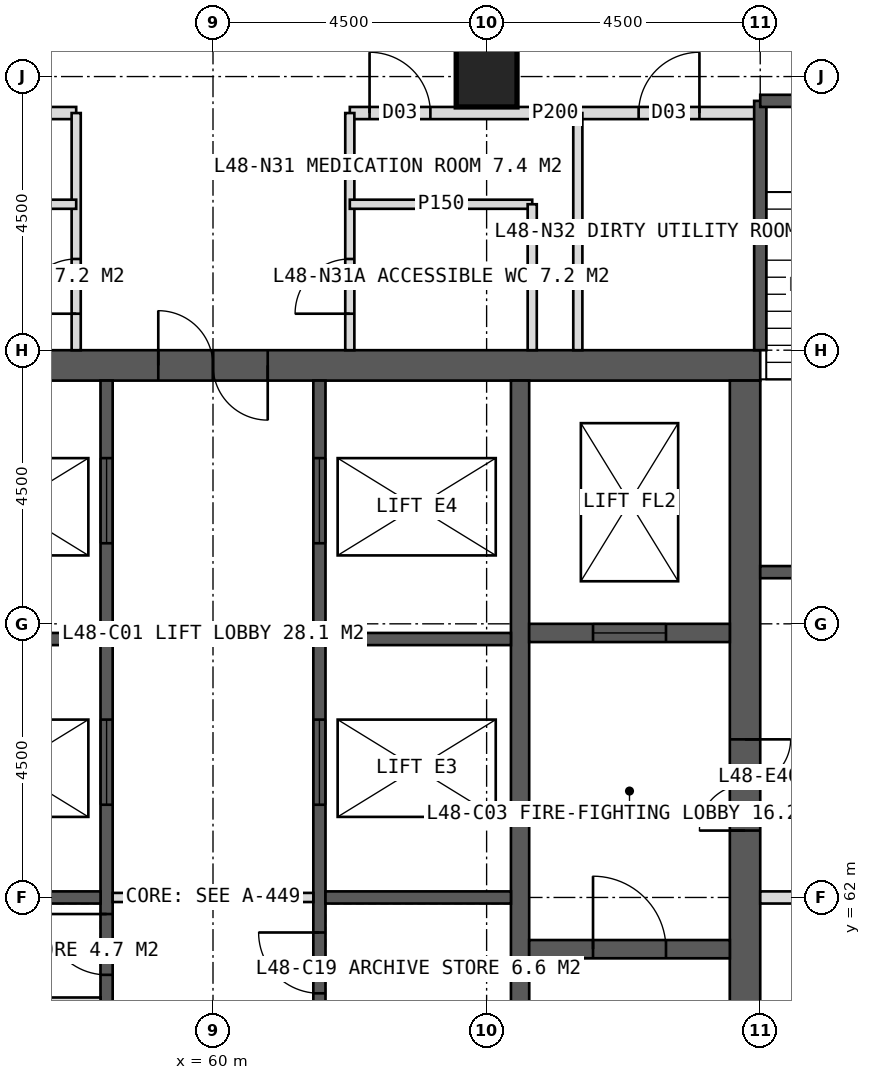
"""IFC4 building model, lengths in metres.
Left out: names, types, materials, properties, quantities, classifications, styles, units other than length and angle.
Written with IfcOpenShell. Run it as: python <this file> out.ifc"""

import sys

from ifc_helpers import new_model, si_unit, direction, frame, frame_2d, origin, origin_2d, place, context, subcontext, project, spatial, rectangle, hollow_rectangle, extrude, element, fill, save


model = new_model("IFC4")
c1 = context("Model", 3, precision=1e-05, world=origin(), true_north=direction((0.0, 1.0)))
c2 = subcontext(c1, "Body", "Model", "MODEL_VIEW")
j1 = project(units=[si_unit("LENGTHUNIT", "METRE"), si_unit("PLANEANGLEUNIT", "RADIAN")], contexts=[c1])
p1 = place(None, origin())
s1 = spatial("IfcSite", under=j1, at=p1, CompositionType="ELEMENT")
p2 = place(p1, origin())
s2 = spatial("IfcBuilding", under=s1, at=p2, CompositionType="ELEMENT")
p3 = place(p2, frame((0.0, 0.0, 201.0)))
s3 = spatial("IfcBuildingStorey", under=s2, at=p3, CompositionType="ELEMENT", Elevation=201.0)
p4 = place(p3, frame((51.0, 70.75, 0.0), z_axis=(0.0, 0.0, 1.0), x_axis=(1.0, 0.0, 0.0)))
e1 = element("IfcWall", 1, at=p4, inside=s3, PredefinedType="SHEAR", context=c2, shape_type="SweptSolid", body=[
    extrude(rectangle(XDim=18.0, YDim=0.5, at=frame_2d((9.0, 0.0))), origin(), (0.0, 0.0, 1.0), 4.0),
])
p5 = place(p4, frame((8.1, 0.0, 0.0)))
e2 = element("IfcOpeningElement", 2, at=p5, cuts=e1, PredefinedType="OPENING", context=c2, shape_type="SweptSolid", body=[
    extrude(rectangle(XDim=1.8, YDim=2.2, at=frame_2d((0.9, 1.1))), frame((0.0, 0.26, 0.0), z_axis=(0.0, -1.0, 0.0), x_axis=(1.0, 0.0, 0.0)), (0.0, 0.0, 1.0), 0.52),
])
p6 = place(p3, frame((68.75, 53.5, 0.0), z_axis=(0.0, 0.0, 1.0), x_axis=(0.0, 1.0, 0.0)))
e3 = element("IfcWall", 3, at=p6, inside=s3, PredefinedType="SHEAR", context=c2, shape_type="SweptSolid", body=[
    extrude(rectangle(XDim=17.0, YDim=0.5, at=frame_2d((8.5, 0.0))), origin(), (0.0, 0.0, 1.0), 4.0),
])
p7 = place(p6, frame((9.6, 0.0, 0.0)))
e4 = element("IfcOpeningElement", 4, at=p7, cuts=e3, PredefinedType="OPENING", context=c2, shape_type="SweptSolid", body=[
    extrude(rectangle(XDim=1.5, YDim=2.2, at=frame_2d((0.75, 1.1))), frame((0.0, 0.26, 0.0), z_axis=(0.0, -1.0, 0.0), x_axis=(1.0, 0.0, 0.0)), (0.0, 0.0, 1.0), 0.52),
])
p8 = place(p3, frame((65.05, 53.5, 0.0), z_axis=(0.0, 0.0, 1.0), x_axis=(0.0, 1.0, 0.0)))
e5 = element("IfcWall", 5, at=p8, inside=s3, PredefinedType="SHEAR", context=c2, shape_type="SweptSolid", body=[
    extrude(rectangle(XDim=17.0, YDim=0.3, at=frame_2d((8.5, 0.0))), origin(), (0.0, 0.0, 1.0), 4.0),
])
p9 = place(p3, frame((58.25, 53.5, 0.0), z_axis=(0.0, 0.0, 1.0), x_axis=(0.0, 1.0, 0.0)))
e6 = element("IfcWall", 6, at=p9, inside=s3, PredefinedType="SHEAR", context=c2, shape_type="SweptSolid", body=[
    extrude(rectangle(XDim=17.0, YDim=0.2, at=frame_2d((8.5, 0.0))), origin(), (0.0, 0.0, 1.0), 4.0),
])
p10 = place(p9, frame((0.393, 0.0, 0.0)))
e7 = element("IfcOpeningElement", 7, at=p10, cuts=e6, PredefinedType="OPENING", context=c2, shape_type="SweptSolid", body=[
    extrude(rectangle(XDim=1.0, YDim=2.1, at=frame_2d((0.5, 1.05))), frame((0.0, 0.11, 0.0), z_axis=(0.0, -1.0, 0.0), x_axis=(1.0, 0.0, 0.0)), (0.0, 0.0, 1.0), 0.22),
])
p11 = place(p9, frame((2.542, 0.0, 0.0)))
e8 = element("IfcOpeningElement", 8, at=p11, cuts=e6, PredefinedType="OPENING", context=c2, shape_type="SweptSolid", body=[
    extrude(rectangle(XDim=1.0, YDim=2.1, at=frame_2d((0.5, 1.05))), frame((0.0, 0.11, 0.0), z_axis=(0.0, -1.0, 0.0), x_axis=(1.0, 0.0, 0.0)), (0.0, 0.0, 1.0), 0.22),
])
p12 = place(p9, frame((5.127, 0.0, 0.0)))
e9 = element("IfcOpeningElement", 9, at=p12, cuts=e6, PredefinedType="OPENING", context=c2, shape_type="SweptSolid", body=[
    extrude(rectangle(XDim=1.0, YDim=2.1, at=frame_2d((0.5, 1.05))), frame((0.0, 0.11, 0.0), z_axis=(0.0, -1.0, 0.0), x_axis=(1.0, 0.0, 0.0)), (0.0, 0.0, 1.0), 0.22),
])
p13 = place(p9, frame((7.228, 0.0, 0.0)))
e10 = element("IfcOpeningElement", 10, at=p13, cuts=e6, PredefinedType="OPENING", context=c2, shape_type="SweptSolid", body=[
    extrude(rectangle(XDim=1.0, YDim=2.1, at=frame_2d((0.5, 1.05))), frame((0.0, 0.11, 0.0), z_axis=(0.0, -1.0, 0.0), x_axis=(1.0, 0.0, 0.0)), (0.0, 0.0, 1.0), 0.22),
])
p14 = place(p9, frame((10.025, 0.0, 0.0)))
e11 = element("IfcOpeningElement", 11, at=p14, cuts=e6, PredefinedType="OPENING", context=c2, shape_type="SweptSolid", body=[
    extrude(rectangle(XDim=1.4, YDim=2.2, at=frame_2d((0.7, 1.1))), frame((0.0, 0.11, 0.0), z_axis=(0.0, -1.0, 0.0), x_axis=(1.0, 0.0, 0.0)), (0.0, 0.0, 1.0), 0.22),
])
p15 = place(p9, frame((14.325, 0.0, 0.0)))
e12 = element("IfcOpeningElement", 12, at=p15, cuts=e6, PredefinedType="OPENING", context=c2, shape_type="SweptSolid", body=[
    extrude(rectangle(XDim=1.4, YDim=2.2, at=frame_2d((0.7, 1.1))), frame((0.0, 0.11, 0.0), z_axis=(0.0, -1.0, 0.0), x_axis=(1.0, 0.0, 0.0)), (0.0, 0.0, 1.0), 0.22),
])
p16 = place(p3, frame((61.75, 53.5, 0.0), z_axis=(0.0, 0.0, 1.0), x_axis=(0.0, 1.0, 0.0)))
e13 = element("IfcWall", 13, at=p16, inside=s3, PredefinedType="SHEAR", context=c2, shape_type="SweptSolid", body=[
    extrude(rectangle(XDim=17.0, YDim=0.2, at=frame_2d((8.5, 0.0))), origin(), (0.0, 0.0, 1.0), 4.0),
])
p17 = place(p16, frame((0.6, 0.0, 0.0)))
e14 = element("IfcOpeningElement", 14, at=p17, cuts=e13, PredefinedType="OPENING", context=c2, shape_type="SweptSolid", body=[
    extrude(rectangle(XDim=1.0, YDim=2.1, at=frame_2d((0.5, 1.05))), frame((0.0, 0.11, 0.0), z_axis=(0.0, -1.0, 0.0), x_axis=(1.0, 0.0, 0.0)), (0.0, 0.0, 1.0), 0.22),
])
p18 = place(p16, frame((2.75, 0.0, 0.0)))
e15 = element("IfcOpeningElement", 15, at=p18, cuts=e13, PredefinedType="OPENING", context=c2, shape_type="SweptSolid", body=[
    extrude(rectangle(XDim=1.0, YDim=2.1, at=frame_2d((0.5, 1.05))), frame((0.0, 0.11, 0.0), z_axis=(0.0, -1.0, 0.0), x_axis=(1.0, 0.0, 0.0)), (0.0, 0.0, 1.0), 0.22),
])
p19 = place(p16, frame((4.824, 0.0, 0.0)))
e16 = element("IfcOpeningElement", 16, at=p19, cuts=e13, PredefinedType="OPENING", context=c2, shape_type="SweptSolid", body=[
    extrude(rectangle(XDim=1.0, YDim=2.1, at=frame_2d((0.5, 1.05))), frame((0.0, 0.11, 0.0), z_axis=(0.0, -1.0, 0.0), x_axis=(1.0, 0.0, 0.0)), (0.0, 0.0, 1.0), 0.22),
])
p20 = place(p16, frame((6.924, 0.0, 0.0)))
e17 = element("IfcOpeningElement", 17, at=p20, cuts=e13, PredefinedType="OPENING", context=c2, shape_type="SweptSolid", body=[
    extrude(rectangle(XDim=1.0, YDim=2.1, at=frame_2d((0.5, 1.05))), frame((0.0, 0.11, 0.0), z_axis=(0.0, -1.0, 0.0), x_axis=(1.0, 0.0, 0.0)), (0.0, 0.0, 1.0), 0.22),
])
p21 = place(p16, frame((10.025, 0.0, 0.0)))
e18 = element("IfcOpeningElement", 18, at=p21, cuts=e13, PredefinedType="OPENING", context=c2, shape_type="SweptSolid", body=[
    extrude(rectangle(XDim=1.4, YDim=2.2, at=frame_2d((0.7, 1.1))), frame((0.0, 0.11, 0.0), z_axis=(0.0, -1.0, 0.0), x_axis=(1.0, 0.0, 0.0)), (0.0, 0.0, 1.0), 0.22),
])
p22 = place(p16, frame((14.325, 0.0, 0.0)))
e19 = element("IfcOpeningElement", 19, at=p22, cuts=e13, PredefinedType="OPENING", context=c2, shape_type="SweptSolid", body=[
    extrude(rectangle(XDim=1.4, YDim=2.2, at=frame_2d((0.7, 1.1))), frame((0.0, 0.11, 0.0), z_axis=(0.0, -1.0, 0.0), x_axis=(1.0, 0.0, 0.0)), (0.0, 0.0, 1.0), 0.22),
])
for number, where, z_axis, x_axis in (
    (20, (55.1, 62.0, 0.0), (0.0, 0.0, 1.0), (1.0, 0.0, 0.0)),
    (21, (61.85, 62.0, 0.0), (0.0, 0.0, 1.0), (1.0, 0.0, 0.0)),
    (22, (55.1, 66.25, 0.0), (0.0, 0.0, 1.0), (1.0, 0.0, 0.0)),
    (23, (61.85, 66.25, 0.0), (0.0, 0.0, 1.0), (1.0, 0.0, 0.0)),
):
    element("IfcWall", number, at=place(p3, frame(where, z_axis=z_axis, x_axis=x_axis)), inside=s3, PredefinedType="SHEAR", context=c2, shape_type="SweptSolid", body=[
        extrude(rectangle(XDim=3.05, YDim=0.2, at=frame_2d((1.525, 0.0))), origin(), (0.0, 0.0, 1.0), 4.0),
    ])
p23 = place(p3, frame((65.2, 61.15, 0.0), z_axis=(0.0, 0.0, 1.0), x_axis=(1.0, 0.0, 0.0)))
e24 = element("IfcWall", 24, at=p23, inside=s3, PredefinedType="SHEAR", context=c2, shape_type="SweptSolid", body=[
    extrude(rectangle(XDim=3.3, YDim=0.3, at=frame_2d((1.65, 0.0))), origin(), (0.0, 0.0, 1.0), 4.0),
])
p24 = place(p23, frame((1.05, 0.0, 0.0)))
e25 = element("IfcOpeningElement", 25, at=p24, cuts=e24, PredefinedType="OPENING", context=c2, shape_type="SweptSolid", body=[
    extrude(rectangle(XDim=1.2, YDim=2.1, at=frame_2d((0.6, 1.05))), frame((0.0, 0.16, 0.0), z_axis=(0.0, -1.0, 0.0), x_axis=(1.0, 0.0, 0.0)), (0.0, 0.0, 1.0), 0.32),
])
p25 = place(p3, frame((65.2, 66.35, 0.0), z_axis=(0.0, 0.0, 1.0), x_axis=(1.0, 0.0, 0.0)))
e26 = element("IfcWall", 26, at=p25, inside=s3, PredefinedType="SHEAR", context=c2, shape_type="SweptSolid", body=[
    extrude(rectangle(XDim=3.3, YDim=0.3, at=frame_2d((1.65, 0.0))), origin(), (0.0, 0.0, 1.0), 4.0),
])
p26 = place(p25, frame((1.05, 0.0, 0.0)))
e27 = element("IfcOpeningElement", 27, at=p26, cuts=e26, PredefinedType="OPENING", context=c2, shape_type="SweptSolid", body=[
    extrude(rectangle(XDim=1.2, YDim=2.2, at=frame_2d((0.6, 1.1))), frame((0.0, 0.16, 0.0), z_axis=(0.0, -1.0, 0.0), x_axis=(1.0, 0.0, 0.0)), (0.0, 0.0, 1.0), 0.32),
])
p27 = place(p3, frame((64.5, 75.5, 0.0), z_axis=(0.0, 0.0, 1.0), x_axis=(1.0, 0.0, 0.0)))
e28 = element("IfcColumn", 28, at=p27, inside=s3, PredefinedType="COLUMN", context=c2, shape_type="SweptSolid", body=[
    extrude(hollow_rectangle(XDim=1.0, YDim=1.0, WallThickness=0.1, at=origin_2d()), origin(), (0.0, 0.0, 1.0), 4.0),
])
p28 = place(p3, frame((51.0, 74.9, 0.0), z_axis=(0.0, 0.0, 1.0), x_axis=(1.0, 0.0, 0.0)))
e29 = element("IfcWall", 29, at=p28, inside=s3, PredefinedType="PARTITIONING", context=c2, shape_type="SweptSolid", body=[
    extrude(rectangle(XDim=6.75, YDim=0.2, at=frame_2d((3.375, 0.0))), origin(), (0.0, 0.0, 1.0), 3.75),
])
p29 = place(p28, frame((1.45, 0.0, 0.0)))
e30 = element("IfcOpeningElement", 30, at=p29, cuts=e29, PredefinedType="OPENING", context=c2, shape_type="SweptSolid", body=[
    extrude(rectangle(XDim=1.0, YDim=2.1, at=frame_2d((0.5, 1.05))), frame((0.0, 0.11, 0.0), z_axis=(0.0, -1.0, 0.0), x_axis=(1.0, 0.0, 0.0)), (0.0, 0.0, 1.0), 0.22),
])
p30 = place(p3, frame((62.25, 74.9, 0.0), z_axis=(0.0, 0.0, 1.0), x_axis=(1.0, 0.0, 0.0)))
e31 = element("IfcWall", 31, at=p30, inside=s3, PredefinedType="PARTITIONING", context=c2, shape_type="SweptSolid", body=[
    extrude(rectangle(XDim=6.75, YDim=0.2, at=frame_2d((3.375, 0.0))), origin(), (0.0, 0.0, 1.0), 3.75),
])
p31 = place(p30, frame((0.325, 0.0, 0.0)))
e32 = element("IfcOpeningElement", 32, at=p31, cuts=e31, PredefinedType="OPENING", context=c2, shape_type="SweptSolid", body=[
    extrude(rectangle(XDim=1.0, YDim=2.1, at=frame_2d((0.5, 1.05))), frame((0.0, 0.11, 0.0), z_axis=(0.0, -1.0, 0.0), x_axis=(1.0, 0.0, 0.0)), (0.0, 0.0, 1.0), 0.22),
])
p32 = place(p30, frame((4.75, 0.0, 0.0)))
e33 = element("IfcOpeningElement", 33, at=p32, cuts=e31, PredefinedType="OPENING", context=c2, shape_type="SweptSolid", body=[
    extrude(rectangle(XDim=1.0, YDim=2.1, at=frame_2d((0.5, 1.05))), frame((0.0, 0.11, 0.0), z_axis=(0.0, -1.0, 0.0), x_axis=(1.0, 0.0, 0.0)), (0.0, 0.0, 1.0), 0.22),
])
p33 = place(p3, frame((57.75, 71.0, 0.0), z_axis=(0.0, 0.0, 1.0), x_axis=(0.0, 1.0, 0.0)))
e34 = element("IfcWall", 34, at=p33, inside=s3, PredefinedType="PARTITIONING", context=c2, shape_type="SweptSolid", body=[
    extrude(rectangle(XDim=3.9, YDim=0.15, at=frame_2d((1.95, 0.0))), origin(), (0.0, 0.0, 1.0), 3.75),
])
p34 = place(p33, frame((0.6, 0.0, 0.0)))
e35 = element("IfcOpeningElement", 35, at=p34, cuts=e34, PredefinedType="OPENING", context=c2, shape_type="SweptSolid", body=[
    extrude(rectangle(XDim=0.9, YDim=2.1, at=frame_2d((0.45, 1.05))), frame((0.0, 0.085, 0.0), z_axis=(0.0, -1.0, 0.0), x_axis=(1.0, 0.0, 0.0)), (0.0, 0.0, 1.0), 0.17),
])
p35 = place(p3, frame((62.25, 71.0, 0.0), z_axis=(0.0, 0.0, 1.0), x_axis=(0.0, 1.0, 0.0)))
e36 = element("IfcWall", 36, at=p35, inside=s3, PredefinedType="PARTITIONING", context=c2, shape_type="SweptSolid", body=[
    extrude(rectangle(XDim=3.9, YDim=0.15, at=frame_2d((1.95, 0.0))), origin(), (0.0, 0.0, 1.0), 3.75),
])
p36 = place(p35, frame((0.6, 0.0, 0.0)))
e37 = element("IfcOpeningElement", 37, at=p36, cuts=e36, PredefinedType="OPENING", context=c2, shape_type="SweptSolid", body=[
    extrude(rectangle(XDim=0.9, YDim=2.1, at=frame_2d((0.45, 1.05))), frame((0.0, 0.085, 0.0), z_axis=(0.0, -1.0, 0.0), x_axis=(1.0, 0.0, 0.0)), (0.0, 0.0, 1.0), 0.17),
])
p37 = place(p3, frame((66.0, 71.0, 0.0), z_axis=(0.0, 0.0, 1.0), x_axis=(0.0, 1.0, 0.0)))
e38 = element("IfcWall", 38, at=p37, inside=s3, PredefinedType="PARTITIONING", context=c2, shape_type="SweptSolid", body=[
    extrude(rectangle(XDim=3.9, YDim=0.15, at=frame_2d((1.95, 0.0))), origin(), (0.0, 0.0, 1.0), 3.75),
])
for number, where, z_axis, x_axis in (
    (39, (54.75, 73.4, 0.0), (0.0, 0.0, 1.0), (1.0, 0.0, 0.0)),
    (40, (62.25, 73.4, 0.0), (0.0, 0.0, 1.0), (1.0, 0.0, 0.0)),
):
    element("IfcWall", number, at=place(p3, frame(where, z_axis=z_axis, x_axis=x_axis)), inside=s3, PredefinedType="PARTITIONING", context=c2, shape_type="SweptSolid", body=[
        extrude(rectangle(XDim=3.0, YDim=0.15, at=frame_2d((1.5, 0.0))), origin(), (0.0, 0.0, 1.0), 3.75),
    ])
p38 = place(p3, frame((65.25, 71.0, 0.0), z_axis=(0.0, 0.0, 1.0), x_axis=(0.0, 1.0, 0.0)))
e41 = element("IfcWall", 41, at=p38, inside=s3, PredefinedType="PARTITIONING", context=c2, shape_type="SweptSolid", body=[
    extrude(rectangle(XDim=2.4, YDim=0.15, at=frame_2d((1.2, 0.0))), origin(), (0.0, 0.0, 1.0), 3.75),
])
p39 = place(p3, frame((69.0, 62.0, 0.0), z_axis=(0.0, 0.0, 1.0), x_axis=(1.0, 0.0, 0.0)))
e42 = element("IfcWall", 42, at=p39, inside=s3, PredefinedType="SOLIDWALL", context=c2, shape_type="SweptSolid", body=[
    extrude(rectangle(XDim=5.7, YDim=0.2, at=frame_2d((2.85, 0.0))), origin(), (0.0, 0.0, 1.0), 2.95),
])
p40 = place(p3, frame((55.1, 60.28, 0.0), z_axis=(0.0, 0.0, 1.0), x_axis=(1.0, 0.0, 0.0)))
e43 = element("IfcWall", 43, at=p40, inside=s3, PredefinedType="PARTITIONING", context=c2, shape_type="SweptSolid", body=[
    extrude(rectangle(XDim=3.05, YDim=0.15, at=frame_2d((1.525, 0.0))), origin(), (0.0, 0.0, 1.0), 3.75),
])
p41 = place(p3, frame((58.35, 62.0, 0.0), z_axis=(0.0, 0.0, 1.0), x_axis=(1.0, 0.0, 0.0)))
e44 = element("IfcWall", 44, at=p41, inside=s3, PredefinedType="PARTITIONING", context=c2, shape_type="SweptSolid", body=[
    extrude(rectangle(XDim=3.3, YDim=0.15, at=frame_2d((1.65, 0.0))), origin(), (0.0, 0.0, 1.0), 3.75),
])
p42 = place(p3, frame((69.0, 71.0, 0.0), z_axis=(0.0, 0.0, 1.0), x_axis=(0.0, 1.0, 0.0)))
e45 = element("IfcWall", 45, at=p42, inside=s3, PredefinedType="SOLIDWALL", context=c2, shape_type="SweptSolid", body=[
    extrude(rectangle(XDim=4.1, YDim=0.2, at=frame_2d((2.05, 0.0))), origin(), (0.0, 0.0, 1.0), 3.75),
])
p43 = place(p3, frame((69.0, 67.35, 0.0), z_axis=(0.0, 0.0, 1.0), x_axis=(1.0, 0.0, 0.0)))
e46 = element("IfcWall", 46, at=p43, inside=s3, PredefinedType="SOLIDWALL", context=c2, shape_type="SweptSolid", body=[
    extrude(rectangle(XDim=3.5, YDim=0.2, at=frame_2d((1.75, 0.0))), origin(), (0.0, 0.0, 1.0), 3.75),
])
p44 = place(p3, frame((69.0, 75.1, 0.0), z_axis=(0.0, 0.0, 1.0), x_axis=(1.0, 0.0, 0.0)))
e47 = element("IfcWall", 47, at=p44, inside=s3, PredefinedType="SOLIDWALL", context=c2, shape_type="SweptSolid", body=[
    extrude(rectangle(XDim=3.5, YDim=0.2, at=frame_2d((1.75, 0.0))), origin(), (0.0, 0.0, 1.0), 3.75),
])
p45 = place(p44, frame((1.15, 0.0, 0.0)))
e48 = element("IfcOpeningElement", 48, at=p45, cuts=e47, PredefinedType="OPENING", context=c2, shape_type="SweptSolid", body=[
    extrude(rectangle(XDim=1.2, YDim=2.1, at=frame_2d((0.6, 1.05))), frame((0.0, 0.11, 0.0), z_axis=(0.0, -1.0, 0.0), x_axis=(1.0, 0.0, 0.0)), (0.0, 0.0, 1.0), 0.22),
])
p46 = place(p34, origin())
e49 = element("IfcDoor", 49, at=p46, inside=s3, OperationType="SINGLE_SWING_LEFT", PredefinedType="DOOR", context=c2, shape_type="SweptSolid", body=[
    extrude(rectangle(XDim=0.9, YDim=2.1, at=frame_2d((0.45, 1.05))), frame((0.0, 0.025, 0.0), z_axis=(0.0, -1.0, 0.0), x_axis=(1.0, 0.0, 0.0)), (0.0, 0.0, 1.0), 0.05),
])
fill(e35, e49)
p47 = place(p36, origin())
e50 = element("IfcDoor", 50, at=p47, inside=s3, OperationType="SINGLE_SWING_LEFT", PredefinedType="DOOR", context=c2, shape_type="SweptSolid", body=[
    extrude(rectangle(XDim=0.9, YDim=2.1, at=frame_2d((0.45, 1.05))), frame((0.0, 0.025, 0.0), z_axis=(0.0, -1.0, 0.0), x_axis=(1.0, 0.0, 0.0)), (0.0, 0.0, 1.0), 0.05),
])
fill(e37, e50)
p48 = place(p31, origin())
e51 = element("IfcDoor", 51, at=p48, inside=s3, OperationType="SINGLE_SWING_LEFT", PredefinedType="DOOR", context=c2, shape_type="SweptSolid", body=[
    extrude(rectangle(XDim=1.0, YDim=2.1, at=frame_2d((0.5, 1.05))), frame((0.0, 0.025, 0.0), z_axis=(0.0, -1.0, 0.0), x_axis=(1.0, 0.0, 0.0)), (0.0, 0.0, 1.0), 0.05),
])
fill(e32, e51)
p49 = place(p32, origin())
e52 = element("IfcDoor", 52, at=p49, inside=s3, OperationType="SINGLE_SWING_RIGHT", PredefinedType="DOOR", context=c2, shape_type="SweptSolid", body=[
    extrude(rectangle(XDim=1.0, YDim=2.1, at=frame_2d((0.5, 1.05))), frame((0.0, 0.025, 0.0), z_axis=(0.0, -1.0, 0.0), x_axis=(1.0, 0.0, 0.0)), (0.0, 0.0, 1.0), 0.05),
])
fill(e33, e52)
p50 = place(p5, origin())
e53 = element("IfcDoor", 53, at=p50, inside=s3, OperationType="DOUBLE_DOOR_SINGLE_SWING", PredefinedType="DOOR", context=c2, shape_type="SweptSolid", body=[
    extrude(rectangle(XDim=1.8, YDim=2.2, at=frame_2d((0.9, 1.1))), frame((0.0, 0.025, 0.0), z_axis=(0.0, -1.0, 0.0), x_axis=(1.0, 0.0, 0.0)), (0.0, 0.0, 1.0), 0.05),
])
fill(e2, e53)
p51 = place(p7, origin())
e54 = element("IfcDoor", 54, at=p51, inside=s3, OperationType="DOUBLE_DOOR_SINGLE_SWING", PredefinedType="DOOR", context=c2, shape_type="SweptSolid", body=[
    extrude(rectangle(XDim=1.5, YDim=2.2, at=frame_2d((0.75, 1.1))), frame((0.0, 0.025, 0.0), z_axis=(0.0, -1.0, 0.0), x_axis=(1.0, 0.0, 0.0)), (0.0, 0.0, 1.0), 0.05),
])
fill(e4, e54)
p52 = place(p24, origin())
e55 = element("IfcDoor", 55, at=p52, inside=s3, OperationType="SINGLE_SWING_LEFT", PredefinedType="DOOR", context=c2, shape_type="SweptSolid", body=[
    extrude(rectangle(XDim=1.2, YDim=2.1, at=frame_2d((0.6, 1.05))), frame((0.0, 0.025, 0.0), z_axis=(0.0, -1.0, 0.0), x_axis=(1.0, 0.0, 0.0)), (0.0, 0.0, 1.0), 0.05),
])
fill(e25, e55)
p53 = place(p26, origin())
e56 = element("IfcDoor", 56, at=p53, inside=s3, OperationType="SLIDING_TO_LEFT", PredefinedType="DOOR", context=c2, shape_type="SweptSolid", body=[
    extrude(rectangle(XDim=1.2, YDim=2.2, at=frame_2d((0.6, 1.1))), frame((0.0, 0.025, 0.0), z_axis=(0.0, -1.0, 0.0), x_axis=(1.0, 0.0, 0.0)), (0.0, 0.0, 1.0), 0.05),
])
fill(e27, e56)
p54 = place(p13, origin())
e57 = element("IfcDoor", 57, at=p54, inside=s3, OperationType="SINGLE_SWING_RIGHT", PredefinedType="DOOR", context=c2, shape_type="SweptSolid", body=[
    extrude(rectangle(XDim=1.0, YDim=2.1, at=frame_2d((0.5, 1.05))), frame((0.0, 0.025, 0.0), z_axis=(0.0, -1.0, 0.0), x_axis=(1.0, 0.0, 0.0)), (0.0, 0.0, 1.0), 0.05),
])
fill(e10, e57)
p55 = place(p20, origin())
e58 = element("IfcDoor", 58, at=p55, inside=s3, OperationType="SINGLE_SWING_RIGHT", PredefinedType="DOOR", context=c2, shape_type="SweptSolid", body=[
    extrude(rectangle(XDim=1.0, YDim=2.1, at=frame_2d((0.5, 1.05))), frame((0.0, 0.025, 0.0), z_axis=(0.0, -1.0, 0.0), x_axis=(1.0, 0.0, 0.0)), (0.0, 0.0, 1.0), 0.05),
])
fill(e17, e58)
p56 = place(p14, origin())
e59 = element("IfcDoor", 59, at=p56, inside=s3, OperationType="SLIDING_TO_LEFT", PredefinedType="DOOR", context=c2, shape_type="SweptSolid", body=[
    extrude(rectangle(XDim=1.4, YDim=2.2, at=frame_2d((0.7, 1.1))), frame((0.0, 0.025, 0.0), z_axis=(0.0, -1.0, 0.0), x_axis=(1.0, 0.0, 0.0)), (0.0, 0.0, 1.0), 0.05),
])
fill(e11, e59)
p57 = place(p21, origin())
e60 = element("IfcDoor", 60, at=p57, inside=s3, OperationType="SLIDING_TO_LEFT", PredefinedType="DOOR", context=c2, shape_type="SweptSolid", body=[
    extrude(rectangle(XDim=1.4, YDim=2.2, at=frame_2d((0.7, 1.1))), frame((0.0, 0.025, 0.0), z_axis=(0.0, -1.0, 0.0), x_axis=(1.0, 0.0, 0.0)), (0.0, 0.0, 1.0), 0.05),
])
fill(e18, e60)
p58 = place(p15, origin())
e61 = element("IfcDoor", 61, at=p58, inside=s3, OperationType="SLIDING_TO_LEFT", PredefinedType="DOOR", context=c2, shape_type="SweptSolid", body=[
    extrude(rectangle(XDim=1.4, YDim=2.2, at=frame_2d((0.7, 1.1))), frame((0.0, 0.025, 0.0), z_axis=(0.0, -1.0, 0.0), x_axis=(1.0, 0.0, 0.0)), (0.0, 0.0, 1.0), 0.05),
])
fill(e12, e61)
p59 = place(p22, origin())
e62 = element("IfcDoor", 62, at=p59, inside=s3, OperationType="SLIDING_TO_LEFT", PredefinedType="DOOR", context=c2, shape_type="SweptSolid", body=[
    extrude(rectangle(XDim=1.4, YDim=2.2, at=frame_2d((0.7, 1.1))), frame((0.0, 0.025, 0.0), z_axis=(0.0, -1.0, 0.0), x_axis=(1.0, 0.0, 0.0)), (0.0, 0.0, 1.0), 0.05),
])
fill(e19, e62)
save(model, sys.argv[1])
